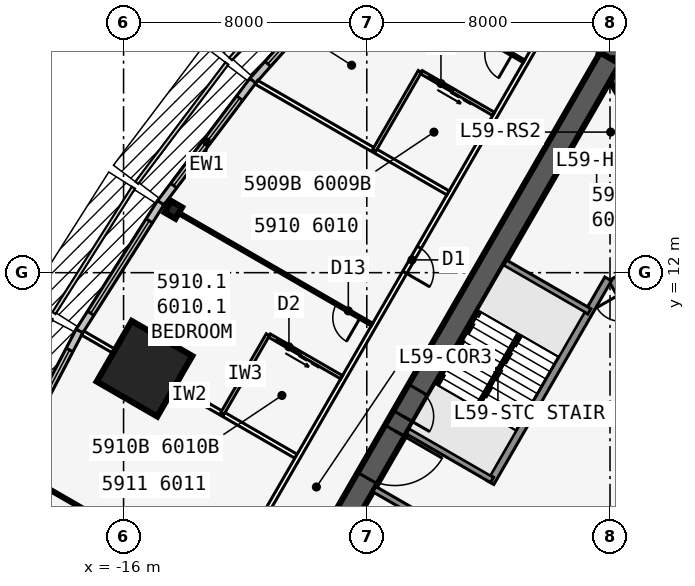
"""IFC4 building model, lengths in metres.
Left out: names, types, materials, properties, quantities, classifications, styles, units other than length and angle.
Written with IfcOpenShell. Run it as: python <this file> out.ifc"""

import sys

from ifc_helpers import new_model, si_unit, direction, frame, frame_2d, origin, origin_2d, place, context, subcontext, project, spatial, rectangle, i_section, extrude, element, fill, save


model = new_model("IFC4")
c1 = context("Model", 3, precision=1e-05, world=origin(), true_north=direction((0.0, 1.0)))
c2 = subcontext(c1, "Body", "Model", "MODEL_VIEW")
j1 = project(units=[si_unit("LENGTHUNIT", "METRE"), si_unit("PLANEANGLEUNIT", "RADIAN")], contexts=[c1])
p1 = place(None, origin())
s1 = spatial("IfcSite", under=j1, at=p1, CompositionType="ELEMENT")
p2 = place(p1, origin())
s2 = spatial("IfcBuilding", under=s1, at=p2, CompositionType="ELEMENT")
p3 = place(p2, frame((0.0, 0.0, 222.5)))
s3 = spatial("IfcBuildingStorey", under=s2, at=p3, CompositionType="ELEMENT", Elevation=222.5)
p4 = place(p3, frame((16.5, -9.526, 0.0), z_axis=(0.0, 0.0, 1.0), x_axis=(-0.499999749417, 0.866025548458, 0.0)))
e1 = element("IfcWall", 1, at=p4, inside=s3, PredefinedType="SHEAR", context=c2, shape_type="SweptSolid", body=[
    extrude(rectangle(XDim=33.0, YDim=0.75, at=frame_2d((16.5, 0.0))), origin(), (0.0, 0.0, 1.0), 3.6),
])
p5 = place(p4, frame((14.15, 0.0, 0.0)))
e2 = element("IfcOpeningElement", 2, at=p5, cuts=e1, PredefinedType="OPENING", context=c2, shape_type="SweptSolid", body=[
    extrude(rectangle(XDim=1.8, YDim=2.13, at=frame_2d((0.9, 1.065))), frame((0.0, 0.385, 0.0), z_axis=(0.0, -1.0, 0.0), x_axis=(1.0, 0.0, 0.0)), (0.0, 0.0, 1.0), 0.77),
])
p6 = place(p4, frame((12.6, 0.0, 0.0)))
e3 = element("IfcOpeningElement", 3, at=p6, cuts=e1, PredefinedType="OPENING", context=c2, shape_type="SweptSolid", body=[
    extrude(rectangle(XDim=1.0, YDim=2.13, at=frame_2d((0.5, 1.065))), frame((0.0, 0.385, 0.0), z_axis=(0.0, -1.0, 0.0), x_axis=(1.0, 0.0, 0.0)), (0.0, 0.0, 1.0), 0.77),
])
p7 = place(p3, frame((5.379, 2.586, 0.0), z_axis=(0.0, 0.0, 1.0), x_axis=(-0.500001375892, 0.866024609411, 0.0)))
e4 = element("IfcWall", 4, at=p7, inside=s3, PredefinedType="SOLIDWALL", context=c2, shape_type="SweptSolid", body=[
    extrude(rectangle(XDim=10.633, YDim=0.25, at=frame_2d((5.316, 0.0))), origin(), (0.0, 0.0, 1.0), 3.435),
])
p8 = place(p7, frame((9.164, 0.0, 0.0)))
e5 = element("IfcOpeningElement", 5, at=p8, cuts=e4, PredefinedType="OPENING", context=c2, shape_type="SweptSolid", body=[
    extrude(rectangle(XDim=0.9, YDim=2.13, at=frame_2d((0.45, 1.065))), frame((0.0, 0.135, 0.0), z_axis=(0.0, -1.0, 0.0), x_axis=(1.0, 0.0, 0.0)), (0.0, 0.0, 1.0), 0.27),
])
p9 = place(p7, frame((1.0, 0.0, 0.0)))
e6 = element("IfcOpeningElement", 6, at=p9, cuts=e4, PredefinedType="OPENING", context=c2, shape_type="SweptSolid", body=[
    extrude(rectangle(XDim=1.1, YDim=2.13, at=frame_2d((0.55, 1.065))), frame((0.0, 0.135, 0.0), z_axis=(0.0, -1.0, 0.0), x_axis=(1.0, 0.0, 0.0)), (0.0, 0.0, 1.0), 0.27),
])
p10 = place(p7, frame((3.9, 0.0, 0.0)))
e7 = element("IfcOpeningElement", 7, at=p10, cuts=e4, PredefinedType="OPENING", context=c2, shape_type="SweptSolid", body=[
    extrude(rectangle(XDim=1.1, YDim=2.13, at=frame_2d((0.55, 1.065))), frame((0.0, 0.135, 0.0), z_axis=(0.0, -1.0, 0.0), x_axis=(1.0, 0.0, 0.0)), (0.0, 0.0, 1.0), 0.27),
])
p11 = place(p7, frame((6.8, 0.0, 0.0)))
e8 = element("IfcOpeningElement", 8, at=p11, cuts=e4, PredefinedType="OPENING", context=c2, shape_type="SweptSolid", body=[
    extrude(rectangle(XDim=1.1, YDim=2.13, at=frame_2d((0.55, 1.065))), frame((0.0, 0.135, 0.0), z_axis=(0.0, -1.0, 0.0), x_axis=(1.0, 0.0, 0.0)), (0.0, 0.0, 1.0), 0.27),
])
p12 = place(p3, frame((0.0, 19.052, 0.0), z_axis=(0.0, 0.0, 1.0), x_axis=(-0.499999749417, -0.866025548458, 0.0)))
e9 = element("IfcWall", 9, at=p12, inside=s3, PredefinedType="SHEAR", context=c2, shape_type="SweptSolid", body=[
    extrude(rectangle(XDim=33.0, YDim=0.75, at=frame_2d((16.5, 0.0))), origin(), (0.0, 0.0, 1.0), 3.6),
])
p13 = place(p12, frame((14.15, 0.0, 0.0)))
e10 = element("IfcOpeningElement", 10, at=p13, cuts=e9, PredefinedType="OPENING", context=c2, shape_type="SweptSolid", body=[
    extrude(rectangle(XDim=1.8, YDim=2.13, at=frame_2d((0.9, 1.065))), frame((0.0, 0.385, 0.0), z_axis=(0.0, -1.0, 0.0), x_axis=(1.0, 0.0, 0.0)), (0.0, 0.0, 1.0), 0.77),
])
p14 = place(p12, frame((12.6, 0.0, 0.0)))
e11 = element("IfcOpeningElement", 11, at=p14, cuts=e9, PredefinedType="OPENING", context=c2, shape_type="SweptSolid", body=[
    extrude(rectangle(XDim=1.0, YDim=2.13, at=frame_2d((0.5, 1.065))), frame((0.0, 0.385, 0.0), z_axis=(0.0, -1.0, 0.0), x_axis=(1.0, 0.0, 0.0)), (0.0, 0.0, 1.0), 0.77),
])
p15 = place(p3, frame((-0.062, 11.794, 0.0), z_axis=(0.0, 0.0, 1.0), x_axis=(-0.500006680225, -0.86602154692, 0.0)))
e12 = element("IfcWall", 12, at=p15, inside=s3, PredefinedType="SOLIDWALL", context=c2, shape_type="SweptSolid", body=[
    extrude(rectangle(XDim=7.733, YDim=0.25, at=frame_2d((3.866, 0.0))), origin(), (0.0, 0.0, 1.0), 3.435),
])
for number, where, z_axis, x_axis in (
    (13, (-0.679, 10.727, 0.0), (0.0, 0.0, 1.0), (-0.866, 0.5, 0.0)),
    (14, (-3.879, 5.184, 0.0), (0.0, 0.0, 1.0), (-0.866, 0.5, 0.0)),
    (15, (-4.979, 3.279, 0.0), (0.0, 0.0, 1.0), (-0.866, 0.5, 0.0)),
):
    element("IfcWall", number, at=place(p3, frame(where, z_axis=z_axis, x_axis=x_axis)), inside=s3, PredefinedType="SOLIDWALL", context=c2, shape_type="SweptSolid", body=[
        extrude(rectangle(XDim=3.2, YDim=0.2, at=frame_2d((1.6, 0.0))), origin(), (0.0, 0.0, 1.0), 3.435),
    ])
p16 = place(p3, frame((0.0, 19.052, 0.0), z_axis=(0.0, 0.0, 1.0), x_axis=(0.0, 1.0, 0.0)))
e16 = element("IfcWall", 16, at=p16, inside=s3, PredefinedType="SHEAR", context=c2, shape_type="SweptSolid", body=[
    extrude(rectangle(XDim=4.746, YDim=0.75, at=frame_2d((2.373, 0.0))), origin(), (0.0, 0.0, 1.0), 3.6),
])
p17 = place(p16, frame((1.725, 0.0, 0.0)))
e17 = element("IfcOpeningElement", 17, at=p17, cuts=e16, PredefinedType="OPENING", context=c2, shape_type="SweptSolid", body=[
    extrude(rectangle(XDim=1.8, YDim=2.13, at=frame_2d((0.9, 1.065))), frame((0.0, 0.385, 0.0), z_axis=(0.0, -1.0, 0.0), x_axis=(1.0, 0.0, 0.0)), (0.0, 0.0, 1.0), 0.77),
])
p18 = place(p3, frame((-14.363, 14.066, 0.0), z_axis=(0.0, 0.0, 1.0), x_axis=(-0.866025403784, 0.5, 0.0)))
e18 = element("IfcColumn", 18, at=p18, inside=s3, PredefinedType="COLUMN", context=c2, shape_type="SweptSolid", body=[
    extrude(i_section(OverallWidth=0.411, OverallDepth=0.434, WebThickness=0.036, FlangeThickness=0.057, at=origin_2d()), origin(), (0.0, 0.0, 1.0), 3.6),
])
p19 = place(p3, frame((-15.312, 8.84, 0.0), z_axis=(0.0, 0.0, 1.0), x_axis=(-0.866025403784, 0.5, 0.0)))
e19 = element("IfcColumn", 19, at=p19, inside=s3, PredefinedType="COLUMN", context=c2, shape_type="SweptSolid", body=[
    extrude(rectangle(XDim=2.3, YDim=2.3, at=origin_2d()), origin(), (0.0, 0.0, 1.0), 3.6),
])
p20 = place(p3, frame((-8.363, 22.12, 0.0), z_axis=(0.0, 0.0, 1.0), x_axis=(-0.664348996191, -0.747422511876, 0.0)))
e20 = element("IfcWall", 20, at=p20, inside=s3, PredefinedType="STANDARD", context=c2, shape_type="SweptSolid", body=[
    extrude(rectangle(XDim=5.105, YDim=0.25, at=frame_2d((2.552, 0.0))), origin(), (0.0, 0.0, 1.0), 3.435),
])
p21 = place(p20, frame((0.752, 0.0, 0.45)))
e21 = element("IfcOpeningElement", 21, at=p21, cuts=e20, PredefinedType="OPENING", context=c2, shape_type="SweptSolid", body=[
    extrude(rectangle(XDim=3.6, YDim=2.6, at=frame_2d((1.8, 1.3))), frame((0.0, 0.135, 0.0), z_axis=(0.0, -1.0, 0.0), x_axis=(1.0, 0.0, 0.0)), (0.0, 0.0, 1.0), 0.27),
])
p22 = place(p3, frame((-11.748, 18.312, 0.0), z_axis=(0.0, 0.0, 1.0), x_axis=(-0.602408653511, -0.798187831388, 0.0)))
e22 = element("IfcWall", 22, at=p22, inside=s3, PredefinedType="STANDARD", context=c2, shape_type="SweptSolid", body=[
    extrude(rectangle(XDim=5.038, YDim=0.25, at=frame_2d((2.519, 0.0))), origin(), (0.0, 0.0, 1.0), 3.435),
])
p23 = place(p22, frame((0.719, 0.0, 0.45)))
e23 = element("IfcOpeningElement", 23, at=p23, cuts=e22, PredefinedType="OPENING", context=c2, shape_type="SweptSolid", body=[
    extrude(rectangle(XDim=3.6, YDim=2.6, at=frame_2d((1.8, 1.3))), frame((0.0, 0.135, 0.0), z_axis=(0.0, -1.0, 0.0), x_axis=(1.0, 0.0, 0.0)), (0.0, 0.0, 1.0), 0.27),
])
p24 = place(p3, frame((-14.777, 14.299, 0.0), z_axis=(0.0, 0.0, 1.0), x_axis=(-0.535220361449, -0.844712474568, 0.0)))
e24 = element("IfcWall", 24, at=p24, inside=s3, PredefinedType="STANDARD", context=c2, shape_type="SweptSolid", body=[
    extrude(rectangle(XDim=5.004, YDim=0.25, at=frame_2d((2.502, 0.0))), origin(), (0.0, 0.0, 1.0), 3.435),
])
p25 = place(p24, frame((0.702, 0.0, 0.45)))
e25 = element("IfcOpeningElement", 25, at=p25, cuts=e24, PredefinedType="OPENING", context=c2, shape_type="SweptSolid", body=[
    extrude(rectangle(XDim=3.6, YDim=2.6, at=frame_2d((1.8, 1.3))), frame((0.0, 0.135, 0.0), z_axis=(0.0, -1.0, 0.0), x_axis=(1.0, 0.0, 0.0)), (0.0, 0.0, 1.0), 0.27),
])
p26 = place(p3, frame((-17.45, 10.081, 0.0), z_axis=(0.0, 0.0, 1.0), x_axis=(-0.463976002579, -0.885847768542, 0.0)))
e26 = element("IfcWall", 26, at=p26, inside=s3, PredefinedType="STANDARD", context=c2, shape_type="SweptSolid", body=[
    extrude(rectangle(XDim=5.004, YDim=0.25, at=frame_2d((2.502, 0.0))), origin(), (0.0, 0.0, 1.0), 3.435),
])
p27 = place(p26, frame((0.702, 0.0, 0.45)))
e27 = element("IfcOpeningElement", 27, at=p27, cuts=e26, PredefinedType="OPENING", context=c2, shape_type="SweptSolid", body=[
    extrude(rectangle(XDim=3.6, YDim=2.6, at=frame_2d((1.8, 1.3))), frame((0.0, 0.135, 0.0), z_axis=(0.0, -1.0, 0.0), x_axis=(1.0, 0.0, 0.0)), (0.0, 0.0, 1.0), 0.27),
])
p28 = place(p3, frame((-0.425, 22.966, 0.0), z_axis=(0.0, 0.0, 1.0), x_axis=(-0.500000265775, -0.866025250339, 0.0)))
e28 = element("IfcWall", 28, at=p28, inside=s3, PredefinedType="PARTITIONING", context=c2, shape_type="SweptSolid", body=[
    extrude(rectangle(XDim=39.354, YDim=0.15, at=frame_2d((19.677, 0.0))), origin(), (0.0, 0.0, 1.0), 3.435),
])
p29 = place(p28, frame((1.665, 0.0, 0.0)))
e29 = element("IfcOpeningElement", 29, at=p29, cuts=e28, PredefinedType="OPENING", context=c2, shape_type="SweptSolid", body=[
    extrude(rectangle(XDim=0.95, YDim=2.13, at=frame_2d((0.475, 1.065))), frame((0.0, 0.085, 0.0), z_axis=(0.0, -1.0, 0.0), x_axis=(1.0, 0.0, 0.0)), (0.0, 0.0, 1.0), 0.17),
])
p30 = place(p28, frame((11.702, 0.0, 0.0)))
e30 = element("IfcOpeningElement", 30, at=p30, cuts=e28, PredefinedType="OPENING", context=c2, shape_type="SweptSolid", body=[
    extrude(rectangle(XDim=0.95, YDim=2.13, at=frame_2d((0.475, 1.065))), frame((0.0, 0.085, 0.0), z_axis=(0.0, -1.0, 0.0), x_axis=(1.0, 0.0, 0.0)), (0.0, 0.0, 1.0), 0.17),
])
p31 = place(p28, frame((21.702, 0.0, 0.0)))
e31 = element("IfcOpeningElement", 31, at=p31, cuts=e28, PredefinedType="OPENING", context=c2, shape_type="SweptSolid", body=[
    extrude(rectangle(XDim=0.95, YDim=2.13, at=frame_2d((0.475, 1.065))), frame((0.0, 0.085, 0.0), z_axis=(0.0, -1.0, 0.0), x_axis=(1.0, 0.0, 0.0)), (0.0, 0.0, 1.0), 0.17),
])
p32 = place(p28, frame((36.739, 0.0, 0.0)))
e32 = element("IfcOpeningElement", 32, at=p32, cuts=e28, PredefinedType="OPENING", context=c2, shape_type="SweptSolid", body=[
    extrude(rectangle(XDim=0.95, YDim=2.13, at=frame_2d((0.475, 1.065))), frame((0.0, 0.085, 0.0), z_axis=(0.0, -1.0, 0.0), x_axis=(1.0, 0.0, 0.0)), (0.0, 0.0, 1.0), 0.17),
])
p33 = place(p3, frame((-2.829, 18.954, 0.0), z_axis=(0.0, 0.0, 1.0), x_axis=(-0.866026604282, 0.499997920671, 0.0)))
e33 = element("IfcWall", 33, at=p33, inside=s3, PredefinedType="PARTITIONING", context=c2, shape_type="SweptSolid", body=[
    extrude(rectangle(XDim=6.24, YDim=0.1, at=frame_2d((3.12, 0.0))), origin(), (0.0, 0.0, 1.0), 2.589),
])
p34 = place(p33, frame((0.45, 0.0, 0.0)))
e34 = element("IfcOpeningElement", 34, at=p34, cuts=e33, PredefinedType="OPENING", context=c2, shape_type="SweptSolid", body=[
    extrude(rectangle(XDim=0.9, YDim=2.13, at=frame_2d((0.45, 1.065))), frame((0.0, 0.06, 0.0), z_axis=(0.0, -1.0, 0.0), x_axis=(1.0, 0.0, 0.0)), (0.0, 0.0, 1.0), 0.12),
])
p35 = place(p3, frame((-5.329, 14.623, 0.0), z_axis=(0.0, 0.0, 1.0), x_axis=(-0.866017877653, 0.500013035415, 0.0)))
e35 = element("IfcWall", 35, at=p35, inside=s3, PredefinedType="PARTITIONING", context=c2, shape_type="SweptSolid", body=[
    extrude(rectangle(XDim=7.273, YDim=0.15, at=frame_2d((3.636, 0.0))), origin(), (0.0, 0.0, 1.0), 2.589),
])
p36 = place(p3, frame((-7.829, 10.293, 0.0), z_axis=(0.0, 0.0, 1.0), x_axis=(-0.866030558329, 0.49999107196, 0.0)))
e36 = element("IfcWall", 36, at=p36, inside=s3, PredefinedType="PARTITIONING", context=c2, shape_type="SweptSolid", body=[
    extrude(rectangle(XDim=7.894, YDim=0.1, at=frame_2d((3.947, 0.0))), origin(), (0.0, 0.0, 1.0), 2.589),
])
p37 = place(p36, frame((0.45, 0.0, 0.0)))
e37 = element("IfcOpeningElement", 37, at=p37, cuts=e36, PredefinedType="OPENING", context=c2, shape_type="SweptSolid", body=[
    extrude(rectangle(XDim=0.9, YDim=2.13, at=frame_2d((0.45, 1.065))), frame((0.0, 0.06, 0.0), z_axis=(0.0, -1.0, 0.0), x_axis=(1.0, 0.0, 0.0)), (0.0, 0.0, 1.0), 0.12),
])
p38 = place(p3, frame((-10.329, 5.963, 0.0), z_axis=(0.0, 0.0, 1.0), x_axis=(-0.866016460812, 0.500015489362, 0.0)))
e38 = element("IfcWall", 38, at=p38, inside=s3, PredefinedType="PARTITIONING", context=c2, shape_type="SweptSolid", body=[
    extrude(rectangle(XDim=8.101, YDim=0.15, at=frame_2d((4.051, 0.0))), origin(), (0.0, 0.0, 1.0), 2.589),
])
p39 = place(p3, frame((-12.829, 1.633, 0.0), z_axis=(0.0, 0.0, 1.0), x_axis=(-0.866030558329, 0.49999107196, 0.0)))
e39 = element("IfcWall", 39, at=p39, inside=s3, PredefinedType="PARTITIONING", context=c2, shape_type="SweptSolid", body=[
    extrude(rectangle(XDim=7.894, YDim=0.1, at=frame_2d((3.947, 0.0))), origin(), (0.0, 0.0, 1.0), 2.589),
])
p40 = place(p39, frame((0.45, 0.0, 0.0)))
e40 = element("IfcOpeningElement", 40, at=p40, cuts=e39, PredefinedType="OPENING", context=c2, shape_type="SweptSolid", body=[
    extrude(rectangle(XDim=0.9, YDim=2.13, at=frame_2d((0.45, 1.065))), frame((0.0, 0.06, 0.0), z_axis=(0.0, -1.0, 0.0), x_axis=(1.0, 0.0, 0.0)), (0.0, 0.0, 1.0), 0.12),
])
p41 = place(p3, frame((-6.253, 18.622, 0.0), z_axis=(0.0, 0.0, 1.0), x_axis=(-0.499990139034, -0.866031096941, 0.0)))
e41 = element("IfcWall", 41, at=p41, inside=s3, PredefinedType="PLUMBINGWALL", context=c2, shape_type="SweptSolid", body=[
    extrude(rectangle(XDim=3.0, YDim=0.12, at=frame_2d((1.5, 0.0))), origin(), (0.0, 0.0, 1.0), 3.435),
])
p42 = place(p3, frame((-3.829, 17.221, 0.0), z_axis=(0.0, 0.0, 1.0), x_axis=(-0.865997131366, 0.500048966069, 0.0)))
e42 = element("IfcWall", 42, at=p42, inside=s3, PredefinedType="PLUMBINGWALL", context=c2, shape_type="SweptSolid", body=[
    extrude(rectangle(XDim=2.74, YDim=0.12, at=frame_2d((1.37, 0.0))), origin(), (0.0, 0.0, 1.0), 3.435),
])
p43 = place(p42, frame((1.55, 0.0, 0.0)))
e43 = element("IfcOpeningElement", 43, at=p43, cuts=e42, PredefinedType="OPENING", context=c2, shape_type="SweptSolid", body=[
    extrude(rectangle(XDim=0.9, YDim=2.13, at=frame_2d((0.45, 1.065))), frame((0.0, 0.07, 0.0), z_axis=(0.0, -1.0, 0.0), x_axis=(1.0, 0.0, 0.0)), (0.0, 0.0, 1.0), 0.14),
])
p44 = place(p3, frame((-11.253, 9.961, 0.0), z_axis=(0.0, 0.0, 1.0), x_axis=(-0.499990139034, -0.866031096941, 0.0)))
e44 = element("IfcWall", 44, at=p44, inside=s3, PredefinedType="PLUMBINGWALL", context=c2, shape_type="SweptSolid", body=[
    extrude(rectangle(XDim=3.0, YDim=0.12, at=frame_2d((1.5, 0.0))), origin(), (0.0, 0.0, 1.0), 3.435),
])
p45 = place(p3, frame((-8.829, 8.561, 0.0), z_axis=(0.0, 0.0, 1.0), x_axis=(-0.866035715982, 0.499982138324, 0.0)))
e45 = element("IfcWall", 45, at=p45, inside=s3, PredefinedType="PLUMBINGWALL", context=c2, shape_type="SweptSolid", body=[
    extrude(rectangle(XDim=2.74, YDim=0.12, at=frame_2d((1.37, 0.0))), origin(), (0.0, 0.0, 1.0), 3.435),
])
p46 = place(p45, frame((1.55, 0.0, 0.0)))
e46 = element("IfcOpeningElement", 46, at=p46, cuts=e45, PredefinedType="OPENING", context=c2, shape_type="SweptSolid", body=[
    extrude(rectangle(XDim=0.9, YDim=2.13, at=frame_2d((0.45, 1.065))), frame((0.0, 0.07, 0.0), z_axis=(0.0, -1.0, 0.0), x_axis=(1.0, 0.0, 0.0)), (0.0, 0.0, 1.0), 0.14),
])
p47 = place(p3, frame((-1.501, 15.703, 0.0), z_axis=(0.0, 0.0, 1.0), x_axis=(1.0, 0.0, 0.0)))
e47 = element("IfcWall", 47, at=p47, inside=s3, PredefinedType="SOLIDWALL", context=c2, shape_type="SweptSolid", body=[
    extrude(rectangle(XDim=3.002, YDim=0.2, at=frame_2d((1.501, 0.0))), origin(), (0.0, 0.0, 1.0), 3.435),
])
p48 = place(p3, frame((-2.988, 9.978, 0.0), z_axis=(0.0, 0.0, 1.0), x_axis=(-0.499992232847, -0.866029888106, 0.0)))
e48 = element("IfcWall", 48, at=p48, inside=s3, PredefinedType="SOLIDWALL", context=c2, shape_type="SweptSolid", body=[
    extrude(rectangle(XDim=2.794, YDim=0.1, at=frame_2d((1.397, 0.0))), origin(), (0.0, 0.0, 1.0), 3.6),
])
p49 = place(p21, origin())
e49 = element("IfcWindow", 49, at=p49, inside=s3, PartitioningType="SINGLE_PANEL", PredefinedType="WINDOW", context=c2, shape_type="SweptSolid", body=[
    extrude(rectangle(XDim=3.6, YDim=2.6, at=frame_2d((1.8, 1.3))), frame((0.0, 0.03, 0.0), z_axis=(0.0, -1.0, 0.0), x_axis=(1.0, 0.0, 0.0)), (0.0, 0.0, 1.0), 0.06),
])
fill(e21, e49)
p50 = place(p23, origin())
e50 = element("IfcWindow", 50, at=p50, inside=s3, PartitioningType="SINGLE_PANEL", PredefinedType="WINDOW", context=c2, shape_type="SweptSolid", body=[
    extrude(rectangle(XDim=3.6, YDim=2.6, at=frame_2d((1.8, 1.3))), frame((0.0, 0.03, 0.0), z_axis=(0.0, -1.0, 0.0), x_axis=(1.0, 0.0, 0.0)), (0.0, 0.0, 1.0), 0.06),
])
fill(e23, e50)
p51 = place(p25, origin())
e51 = element("IfcWindow", 51, at=p51, inside=s3, PartitioningType="SINGLE_PANEL", PredefinedType="WINDOW", context=c2, shape_type="SweptSolid", body=[
    extrude(rectangle(XDim=3.6, YDim=2.6, at=frame_2d((1.8, 1.3))), frame((0.0, 0.03, 0.0), z_axis=(0.0, -1.0, 0.0), x_axis=(1.0, 0.0, 0.0)), (0.0, 0.0, 1.0), 0.06),
])
fill(e25, e51)
p52 = place(p27, origin())
e52 = element("IfcWindow", 52, at=p52, inside=s3, PartitioningType="SINGLE_PANEL", PredefinedType="WINDOW", context=c2, shape_type="SweptSolid", body=[
    extrude(rectangle(XDim=3.6, YDim=2.6, at=frame_2d((1.8, 1.3))), frame((0.0, 0.03, 0.0), z_axis=(0.0, -1.0, 0.0), x_axis=(1.0, 0.0, 0.0)), (0.0, 0.0, 1.0), 0.06),
])
fill(e27, e52)
p53 = place(p34, origin())
e53 = element("IfcDoor", 53, at=p53, inside=s3, OperationType="SINGLE_SWING_LEFT", PredefinedType="DOOR", context=c2, shape_type="SweptSolid", body=[
    extrude(rectangle(XDim=0.9, YDim=2.13, at=frame_2d((0.45, 1.065))), frame((0.0, 0.025, 0.0), z_axis=(0.0, -1.0, 0.0), x_axis=(1.0, 0.0, 0.0)), (0.0, 0.0, 1.0), 0.05),
])
fill(e34, e53)
p54 = place(p37, origin())
e54 = element("IfcDoor", 54, at=p54, inside=s3, OperationType="SINGLE_SWING_LEFT", PredefinedType="DOOR", context=c2, shape_type="SweptSolid", body=[
    extrude(rectangle(XDim=0.9, YDim=2.13, at=frame_2d((0.45, 1.065))), frame((0.0, 0.025, 0.0), z_axis=(0.0, -1.0, 0.0), x_axis=(1.0, 0.0, 0.0)), (0.0, 0.0, 1.0), 0.05),
])
fill(e37, e54)
p55 = place(p43, origin())
e55 = element("IfcDoor", 55, at=p55, inside=s3, OperationType="SLIDING_TO_LEFT", PredefinedType="DOOR", context=c2, shape_type="SweptSolid", body=[
    extrude(rectangle(XDim=0.9, YDim=2.13, at=frame_2d((0.45, 1.065))), frame((0.0, 0.025, 0.0), z_axis=(0.0, -1.0, 0.0), x_axis=(1.0, 0.0, 0.0)), (0.0, 0.0, 1.0), 0.05),
])
fill(e43, e55)
p56 = place(p30, origin())
e56 = element("IfcDoor", 56, at=p56, inside=s3, OperationType="SINGLE_SWING_RIGHT", PredefinedType="DOOR", context=c2, shape_type="SweptSolid", body=[
    extrude(rectangle(XDim=0.95, YDim=2.13, at=frame_2d((0.475, 1.065))), frame((0.0, 0.025, 0.0), z_axis=(0.0, -1.0, 0.0), x_axis=(1.0, 0.0, 0.0)), (0.0, 0.0, 1.0), 0.05),
])
fill(e30, e56)
p57 = place(p46, origin())
e57 = element("IfcDoor", 57, at=p57, inside=s3, OperationType="SLIDING_TO_LEFT", PredefinedType="DOOR", context=c2, shape_type="SweptSolid", body=[
    extrude(rectangle(XDim=0.9, YDim=2.13, at=frame_2d((0.45, 1.065))), frame((0.0, 0.025, 0.0), z_axis=(0.0, -1.0, 0.0), x_axis=(1.0, 0.0, 0.0)), (0.0, 0.0, 1.0), 0.05),
])
fill(e46, e57)
p58 = place(p13, origin())
e58 = element("IfcDoor", 58, at=p58, inside=s3, OperationType="DOUBLE_DOOR_SINGLE_SWING", PredefinedType="DOOR", context=c2, shape_type="SweptSolid", body=[
    extrude(rectangle(XDim=1.8, YDim=2.13, at=frame_2d((0.9, 1.065))), frame((0.0, 0.025, 0.0), z_axis=(0.0, -1.0, 0.0), x_axis=(1.0, 0.0, 0.0)), (0.0, 0.0, 1.0), 0.05),
])
fill(e10, e58)
p59 = place(p14, origin())
e59 = element("IfcDoor", 59, at=p59, inside=s3, OperationType="SINGLE_SWING_RIGHT", PredefinedType="DOOR", context=c2, shape_type="SweptSolid", body=[
    extrude(rectangle(XDim=1.0, YDim=2.13, at=frame_2d((0.5, 1.065))), frame((0.0, 0.025, 0.0), z_axis=(0.0, -1.0, 0.0), x_axis=(1.0, 0.0, 0.0)), (0.0, 0.0, 1.0), 0.05),
])
fill(e11, e59)
save(model, sys.argv[1])
